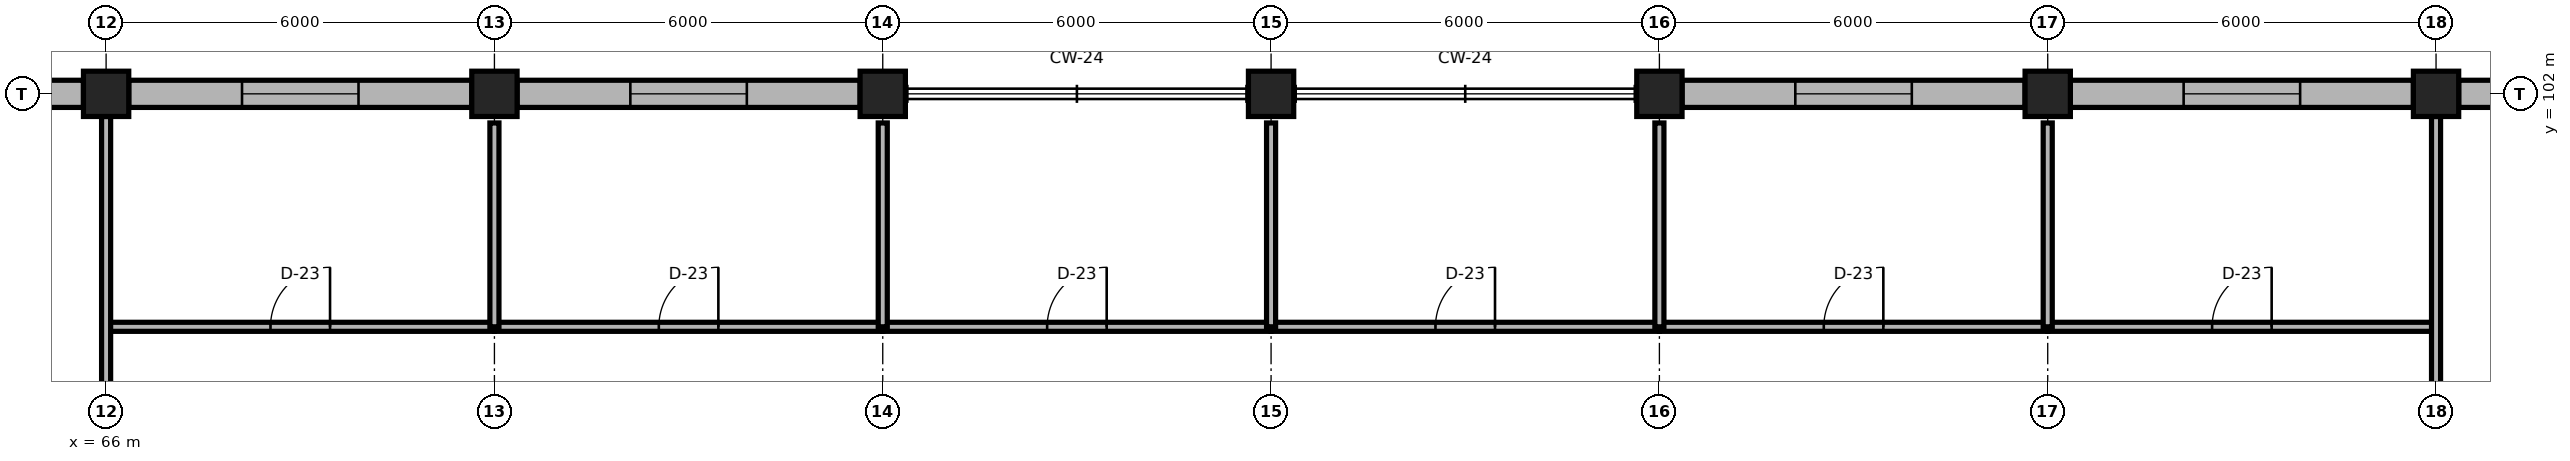
"""IFC4 building model, lengths in metres.
Left out: names, types, materials, properties, quantities, classifications, styles, units other than length and angle.
Written with IfcOpenShell. Run it as: python <this file> out.ifc"""

import sys

from ifc_helpers import new_model, si_unit, direction, frame, frame_2d, origin, origin_2d, place, context, subcontext, project, spatial, rectangle, extrude, element, fill, save


model = new_model("IFC4")
c1 = context("Model", 3, precision=1e-05, world=origin(), true_north=direction((0.0, 1.0)))
c2 = subcontext(c1, "Body", "Model", "MODEL_VIEW")
j1 = project(units=[si_unit("LENGTHUNIT", "METRE"), si_unit("PLANEANGLEUNIT", "RADIAN")], contexts=[c1])
p1 = place(None, origin())
s1 = spatial("IfcSite", under=j1, at=p1, CompositionType="ELEMENT")
p2 = place(p1, origin())
s2 = spatial("IfcBuilding", under=s1, at=p2, CompositionType="ELEMENT")
p3 = place(p2, frame((0.0, 0.0, 63.9)))
s3 = spatial("IfcBuildingStorey", under=s2, at=p3, CompositionType="ELEMENT", Elevation=63.9)
for number, where, z_axis, x_axis in (
    (1, (66.0, 102.0, 0.0), (0.0, 0.0, 1.0), (1.0, 0.0, 0.0)),
    (2, (72.0, 102.0, 0.0), (0.0, 0.0, 1.0), (1.0, 0.0, 0.0)),
    (3, (78.0, 102.0, 0.0), (0.0, 0.0, 1.0), (1.0, 0.0, 0.0)),
    (4, (84.0, 102.0, 0.0), (0.0, 0.0, 1.0), (1.0, 0.0, 0.0)),
    (5, (90.0, 102.0, 0.0), (0.0, 0.0, 1.0), (1.0, 0.0, 0.0)),
    (6, (96.0, 102.0, 0.0), (0.0, 0.0, 1.0), (1.0, 0.0, 0.0)),
    (7, (102.0, 102.0, 0.0), (0.0, 0.0, 1.0), (1.0, 0.0, 0.0)),
):
    element("IfcColumn", number, at=place(p3, frame(where, z_axis=z_axis, x_axis=x_axis)), inside=s3, PredefinedType="COLUMN", context=c2, shape_type="SweptSolid", body=[
        extrude(rectangle(XDim=0.7, YDim=0.7, at=origin_2d()), origin(), (0.0, 0.0, 1.0), 3.9),
    ])
p4 = place(p3, frame((60.35, 102.0, 0.0), z_axis=(0.0, 0.0, 1.0), x_axis=(1.0, 0.0, 0.0)))
e8 = element("IfcWall", 8, at=p4, inside=s3, PredefinedType="SOLIDWALL", context=c2, shape_type="SweptSolid", body=[
    extrude(rectangle(XDim=5.3, YDim=0.42, at=frame_2d((2.65, 0.0))), origin(), (0.0, 0.0, 1.0), 3.24),
])
p5 = place(p4, frame((1.75, 0.0, 0.85)))
e9 = element("IfcOpeningElement", 9, at=p5, cuts=e8, PredefinedType="OPENING", context=c2, shape_type="SweptSolid", body=[
    extrude(rectangle(XDim=1.8, YDim=1.95, at=frame_2d((0.9, 0.975))), frame((0.0, 0.225, 0.0), z_axis=(0.0, -1.0, 0.0), x_axis=(1.0, 0.0, 0.0)), (0.0, 0.0, 1.0), 0.45),
])
p6 = place(p3, frame((66.35, 102.0, 0.0), z_axis=(0.0, 0.0, 1.0), x_axis=(1.0, 0.0, 0.0)))
e10 = element("IfcWall", 10, at=p6, inside=s3, PredefinedType="SOLIDWALL", context=c2, shape_type="SweptSolid", body=[
    extrude(rectangle(XDim=5.3, YDim=0.42, at=frame_2d((2.65, 0.0))), origin(), (0.0, 0.0, 1.0), 3.24),
])
p7 = place(p6, frame((1.75, 0.0, 0.85)))
e11 = element("IfcOpeningElement", 11, at=p7, cuts=e10, PredefinedType="OPENING", context=c2, shape_type="SweptSolid", body=[
    extrude(rectangle(XDim=1.8, YDim=1.95, at=frame_2d((0.9, 0.975))), frame((0.0, 0.225, 0.0), z_axis=(0.0, -1.0, 0.0), x_axis=(1.0, 0.0, 0.0)), (0.0, 0.0, 1.0), 0.45),
])
p8 = place(p3, frame((72.35, 102.0, 0.0), z_axis=(0.0, 0.0, 1.0), x_axis=(1.0, 0.0, 0.0)))
e12 = element("IfcWall", 12, at=p8, inside=s3, PredefinedType="SOLIDWALL", context=c2, shape_type="SweptSolid", body=[
    extrude(rectangle(XDim=5.3, YDim=0.42, at=frame_2d((2.65, 0.0))), origin(), (0.0, 0.0, 1.0), 3.24),
])
p9 = place(p8, frame((1.75, 0.0, 0.85)))
e13 = element("IfcOpeningElement", 13, at=p9, cuts=e12, PredefinedType="OPENING", context=c2, shape_type="SweptSolid", body=[
    extrude(rectangle(XDim=1.8, YDim=1.95, at=frame_2d((0.9, 0.975))), frame((0.0, 0.225, 0.0), z_axis=(0.0, -1.0, 0.0), x_axis=(1.0, 0.0, 0.0)), (0.0, 0.0, 1.0), 0.45),
])
p10 = place(p3, frame((90.35, 102.0, 0.0), z_axis=(0.0, 0.0, 1.0), x_axis=(1.0, 0.0, 0.0)))
e14 = element("IfcWall", 14, at=p10, inside=s3, PredefinedType="SOLIDWALL", context=c2, shape_type="SweptSolid", body=[
    extrude(rectangle(XDim=5.3, YDim=0.42, at=frame_2d((2.65, 0.0))), origin(), (0.0, 0.0, 1.0), 3.24),
])
p11 = place(p10, frame((1.75, 0.0, 0.85)))
e15 = element("IfcOpeningElement", 15, at=p11, cuts=e14, PredefinedType="OPENING", context=c2, shape_type="SweptSolid", body=[
    extrude(rectangle(XDim=1.8, YDim=1.95, at=frame_2d((0.9, 0.975))), frame((0.0, 0.225, 0.0), z_axis=(0.0, -1.0, 0.0), x_axis=(1.0, 0.0, 0.0)), (0.0, 0.0, 1.0), 0.45),
])
p12 = place(p3, frame((96.35, 102.0, 0.0), z_axis=(0.0, 0.0, 1.0), x_axis=(1.0, 0.0, 0.0)))
e16 = element("IfcWall", 16, at=p12, inside=s3, PredefinedType="SOLIDWALL", context=c2, shape_type="SweptSolid", body=[
    extrude(rectangle(XDim=5.3, YDim=0.42, at=frame_2d((2.65, 0.0))), origin(), (0.0, 0.0, 1.0), 3.24),
])
p13 = place(p12, frame((1.75, 0.0, 0.85)))
e17 = element("IfcOpeningElement", 17, at=p13, cuts=e16, PredefinedType="OPENING", context=c2, shape_type="SweptSolid", body=[
    extrude(rectangle(XDim=1.8, YDim=1.95, at=frame_2d((0.9, 0.975))), frame((0.0, 0.225, 0.0), z_axis=(0.0, -1.0, 0.0), x_axis=(1.0, 0.0, 0.0)), (0.0, 0.0, 1.0), 0.45),
])
p14 = place(p3, frame((102.35, 102.0, 0.0), z_axis=(0.0, 0.0, 1.0), x_axis=(1.0, 0.0, 0.0)))
e18 = element("IfcWall", 18, at=p14, inside=s3, PredefinedType="SOLIDWALL", context=c2, shape_type="SweptSolid", body=[
    extrude(rectangle(XDim=5.3, YDim=0.42, at=frame_2d((2.65, 0.0))), origin(), (0.0, 0.0, 1.0), 3.24),
])
p15 = place(p14, frame((1.75, 0.0, 0.85)))
e19 = element("IfcOpeningElement", 19, at=p15, cuts=e18, PredefinedType="OPENING", context=c2, shape_type="SweptSolid", body=[
    extrude(rectangle(XDim=1.8, YDim=1.95, at=frame_2d((0.9, 0.975))), frame((0.0, 0.225, 0.0), z_axis=(0.0, -1.0, 0.0), x_axis=(1.0, 0.0, 0.0)), (0.0, 0.0, 1.0), 0.45),
])
p16 = place(p3, frame((66.0, 98.4, 0.0), z_axis=(0.0, 0.0, 1.0), x_axis=(1.0, 0.0, 0.0)))
e20 = element("IfcWall", 20, at=p16, inside=s3, PredefinedType="PARTITIONING", context=c2, shape_type="SweptSolid", body=[
    extrude(rectangle(XDim=6.0, YDim=0.14, at=frame_2d((3.0, 0.0))), origin(), (0.0, 0.0, 1.0), 3.66),
])
p17 = place(p16, frame((2.54, 0.0, 0.0)))
e21 = element("IfcOpeningElement", 21, at=p17, cuts=e20, PredefinedType="OPENING", context=c2, shape_type="SweptSolid", body=[
    extrude(rectangle(XDim=0.92, YDim=2.15, at=frame_2d((0.46, 1.075))), frame((0.0, 0.085, 0.0), z_axis=(0.0, -1.0, 0.0), x_axis=(1.0, 0.0, 0.0)), (0.0, 0.0, 1.0), 0.17),
])
p18 = place(p3, frame((72.0, 98.4, 0.0), z_axis=(0.0, 0.0, 1.0), x_axis=(1.0, 0.0, 0.0)))
e22 = element("IfcWall", 22, at=p18, inside=s3, PredefinedType="PARTITIONING", context=c2, shape_type="SweptSolid", body=[
    extrude(rectangle(XDim=6.0, YDim=0.14, at=frame_2d((3.0, 0.0))), origin(), (0.0, 0.0, 1.0), 3.66),
])
p19 = place(p18, frame((2.54, 0.0, 0.0)))
e23 = element("IfcOpeningElement", 23, at=p19, cuts=e22, PredefinedType="OPENING", context=c2, shape_type="SweptSolid", body=[
    extrude(rectangle(XDim=0.92, YDim=2.15, at=frame_2d((0.46, 1.075))), frame((0.0, 0.085, 0.0), z_axis=(0.0, -1.0, 0.0), x_axis=(1.0, 0.0, 0.0)), (0.0, 0.0, 1.0), 0.17),
])
p20 = place(p3, frame((78.0, 98.4, 0.0), z_axis=(0.0, 0.0, 1.0), x_axis=(1.0, 0.0, 0.0)))
e24 = element("IfcWall", 24, at=p20, inside=s3, PredefinedType="PARTITIONING", context=c2, shape_type="SweptSolid", body=[
    extrude(rectangle(XDim=6.0, YDim=0.14, at=frame_2d((3.0, 0.0))), origin(), (0.0, 0.0, 1.0), 3.66),
])
p21 = place(p20, frame((2.54, 0.0, 0.0)))
e25 = element("IfcOpeningElement", 25, at=p21, cuts=e24, PredefinedType="OPENING", context=c2, shape_type="SweptSolid", body=[
    extrude(rectangle(XDim=0.92, YDim=2.15, at=frame_2d((0.46, 1.075))), frame((0.0, 0.085, 0.0), z_axis=(0.0, -1.0, 0.0), x_axis=(1.0, 0.0, 0.0)), (0.0, 0.0, 1.0), 0.17),
])
p22 = place(p3, frame((84.0, 98.4, 0.0), z_axis=(0.0, 0.0, 1.0), x_axis=(1.0, 0.0, 0.0)))
e26 = element("IfcWall", 26, at=p22, inside=s3, PredefinedType="PARTITIONING", context=c2, shape_type="SweptSolid", body=[
    extrude(rectangle(XDim=6.0, YDim=0.14, at=frame_2d((3.0, 0.0))), origin(), (0.0, 0.0, 1.0), 3.66),
])
p23 = place(p22, frame((2.54, 0.0, 0.0)))
e27 = element("IfcOpeningElement", 27, at=p23, cuts=e26, PredefinedType="OPENING", context=c2, shape_type="SweptSolid", body=[
    extrude(rectangle(XDim=0.92, YDim=2.15, at=frame_2d((0.46, 1.075))), frame((0.0, 0.085, 0.0), z_axis=(0.0, -1.0, 0.0), x_axis=(1.0, 0.0, 0.0)), (0.0, 0.0, 1.0), 0.17),
])
p24 = place(p3, frame((90.0, 98.4, 0.0), z_axis=(0.0, 0.0, 1.0), x_axis=(1.0, 0.0, 0.0)))
e28 = element("IfcWall", 28, at=p24, inside=s3, PredefinedType="PARTITIONING", context=c2, shape_type="SweptSolid", body=[
    extrude(rectangle(XDim=6.0, YDim=0.14, at=frame_2d((3.0, 0.0))), origin(), (0.0, 0.0, 1.0), 3.66),
])
p25 = place(p24, frame((2.54, 0.0, 0.0)))
e29 = element("IfcOpeningElement", 29, at=p25, cuts=e28, PredefinedType="OPENING", context=c2, shape_type="SweptSolid", body=[
    extrude(rectangle(XDim=0.92, YDim=2.15, at=frame_2d((0.46, 1.075))), frame((0.0, 0.085, 0.0), z_axis=(0.0, -1.0, 0.0), x_axis=(1.0, 0.0, 0.0)), (0.0, 0.0, 1.0), 0.17),
])
p26 = place(p3, frame((96.0, 98.4, 0.0), z_axis=(0.0, 0.0, 1.0), x_axis=(1.0, 0.0, 0.0)))
e30 = element("IfcWall", 30, at=p26, inside=s3, PredefinedType="PARTITIONING", context=c2, shape_type="SweptSolid", body=[
    extrude(rectangle(XDim=6.0, YDim=0.14, at=frame_2d((3.0, 0.0))), origin(), (0.0, 0.0, 1.0), 3.66),
])
p27 = place(p26, frame((2.54, 0.0, 0.0)))
e31 = element("IfcOpeningElement", 31, at=p27, cuts=e30, PredefinedType="OPENING", context=c2, shape_type="SweptSolid", body=[
    extrude(rectangle(XDim=0.92, YDim=2.15, at=frame_2d((0.46, 1.075))), frame((0.0, 0.085, 0.0), z_axis=(0.0, -1.0, 0.0), x_axis=(1.0, 0.0, 0.0)), (0.0, 0.0, 1.0), 0.17),
])
for number, where, z_axis, x_axis in (
    (32, (72.0, 98.4, 0.0), (0.0, 0.0, 1.0), (0.0, 1.0, 0.0)),
    (33, (78.0, 98.4, 0.0), (0.0, 0.0, 1.0), (0.0, 1.0, 0.0)),
    (34, (84.0, 98.4, 0.0), (0.0, 0.0, 1.0), (0.0, 1.0, 0.0)),
    (35, (90.0, 98.4, 0.0), (0.0, 0.0, 1.0), (0.0, 1.0, 0.0)),
    (36, (96.0, 98.4, 0.0), (0.0, 0.0, 1.0), (0.0, 1.0, 0.0)),
):
    element("IfcWall", number, at=place(p3, frame(where, z_axis=z_axis, x_axis=x_axis)), inside=s3, PredefinedType="PARTITIONING", context=c2, shape_type="SweptSolid", body=[
        extrude(rectangle(XDim=3.15, YDim=0.14, at=frame_2d((1.575, 0.0))), origin(), (0.0, 0.0, 1.0), 3.369),
    ])
for number, where, z_axis, x_axis in (
    (37, (66.0, 96.35, 0.0), (0.0, 0.0, 1.0), (0.0, 1.0, 0.0)),
    (38, (102.0, 96.35, 0.0), (0.0, 0.0, 1.0), (0.0, 1.0, 0.0)),
):
    element("IfcWall", number, at=place(p3, frame(where, z_axis=z_axis, x_axis=x_axis)), inside=s3, PredefinedType="PARTITIONING", context=c2, shape_type="SweptSolid", body=[
        extrude(rectangle(XDim=5.3, YDim=0.14, at=frame_2d((2.65, 0.0))), origin(), (0.0, 0.0, 1.0), 3.369),
    ])
p28 = place(p7, origin())
e39 = element("IfcWindow", 39, at=p28, inside=s3, PartitioningType="SINGLE_PANEL", PredefinedType="WINDOW", context=c2, shape_type="SweptSolid", body=[
    extrude(rectangle(XDim=1.8, YDim=1.95, at=frame_2d((0.9, 0.975))), frame((0.0, 0.03, 0.0), z_axis=(0.0, -1.0, 0.0), x_axis=(1.0, 0.0, 0.0)), (0.0, 0.0, 1.0), 0.06),
])
fill(e11, e39)
p29 = place(p9, origin())
e40 = element("IfcWindow", 40, at=p29, inside=s3, PartitioningType="SINGLE_PANEL", PredefinedType="WINDOW", context=c2, shape_type="SweptSolid", body=[
    extrude(rectangle(XDim=1.8, YDim=1.95, at=frame_2d((0.9, 0.975))), frame((0.0, 0.03, 0.0), z_axis=(0.0, -1.0, 0.0), x_axis=(1.0, 0.0, 0.0)), (0.0, 0.0, 1.0), 0.06),
])
fill(e13, e40)
p30 = place(p11, origin())
e41 = element("IfcWindow", 41, at=p30, inside=s3, PartitioningType="SINGLE_PANEL", PredefinedType="WINDOW", context=c2, shape_type="SweptSolid", body=[
    extrude(rectangle(XDim=1.8, YDim=1.95, at=frame_2d((0.9, 0.975))), frame((0.0, 0.03, 0.0), z_axis=(0.0, -1.0, 0.0), x_axis=(1.0, 0.0, 0.0)), (0.0, 0.0, 1.0), 0.06),
])
fill(e15, e41)
p31 = place(p13, origin())
e42 = element("IfcWindow", 42, at=p31, inside=s3, PartitioningType="SINGLE_PANEL", PredefinedType="WINDOW", context=c2, shape_type="SweptSolid", body=[
    extrude(rectangle(XDim=1.8, YDim=1.95, at=frame_2d((0.9, 0.975))), frame((0.0, 0.03, 0.0), z_axis=(0.0, -1.0, 0.0), x_axis=(1.0, 0.0, 0.0)), (0.0, 0.0, 1.0), 0.06),
])
fill(e17, e42)
p32 = place(p17, origin())
e43 = element("IfcDoor", 43, at=p32, inside=s3, OperationType="SINGLE_SWING_RIGHT", PredefinedType="DOOR", context=c2, shape_type="SweptSolid", body=[
    extrude(rectangle(XDim=0.92, YDim=2.15, at=frame_2d((0.46, 1.075))), frame((0.0, 0.025, 0.0), z_axis=(0.0, -1.0, 0.0), x_axis=(1.0, 0.0, 0.0)), (0.0, 0.0, 1.0), 0.05),
])
fill(e21, e43)
p33 = place(p19, origin())
e44 = element("IfcDoor", 44, at=p33, inside=s3, OperationType="SINGLE_SWING_RIGHT", PredefinedType="DOOR", context=c2, shape_type="SweptSolid", body=[
    extrude(rectangle(XDim=0.92, YDim=2.15, at=frame_2d((0.46, 1.075))), frame((0.0, 0.025, 0.0), z_axis=(0.0, -1.0, 0.0), x_axis=(1.0, 0.0, 0.0)), (0.0, 0.0, 1.0), 0.05),
])
fill(e23, e44)
p34 = place(p21, origin())
e45 = element("IfcDoor", 45, at=p34, inside=s3, OperationType="SINGLE_SWING_RIGHT", PredefinedType="DOOR", context=c2, shape_type="SweptSolid", body=[
    extrude(rectangle(XDim=0.92, YDim=2.15, at=frame_2d((0.46, 1.075))), frame((0.0, 0.025, 0.0), z_axis=(0.0, -1.0, 0.0), x_axis=(1.0, 0.0, 0.0)), (0.0, 0.0, 1.0), 0.05),
])
fill(e25, e45)
p35 = place(p23, origin())
e46 = element("IfcDoor", 46, at=p35, inside=s3, OperationType="SINGLE_SWING_RIGHT", PredefinedType="DOOR", context=c2, shape_type="SweptSolid", body=[
    extrude(rectangle(XDim=0.92, YDim=2.15, at=frame_2d((0.46, 1.075))), frame((0.0, 0.025, 0.0), z_axis=(0.0, -1.0, 0.0), x_axis=(1.0, 0.0, 0.0)), (0.0, 0.0, 1.0), 0.05),
])
fill(e27, e46)
p36 = place(p25, origin())
e47 = element("IfcDoor", 47, at=p36, inside=s3, OperationType="SINGLE_SWING_RIGHT", PredefinedType="DOOR", context=c2, shape_type="SweptSolid", body=[
    extrude(rectangle(XDim=0.92, YDim=2.15, at=frame_2d((0.46, 1.075))), frame((0.0, 0.025, 0.0), z_axis=(0.0, -1.0, 0.0), x_axis=(1.0, 0.0, 0.0)), (0.0, 0.0, 1.0), 0.05),
])
fill(e29, e47)
p37 = place(p27, origin())
e48 = element("IfcDoor", 48, at=p37, inside=s3, OperationType="SINGLE_SWING_RIGHT", PredefinedType="DOOR", context=c2, shape_type="SweptSolid", body=[
    extrude(rectangle(XDim=0.92, YDim=2.15, at=frame_2d((0.46, 1.075))), frame((0.0, 0.025, 0.0), z_axis=(0.0, -1.0, 0.0), x_axis=(1.0, 0.0, 0.0)), (0.0, 0.0, 1.0), 0.05),
])
fill(e31, e48)
save(model, sys.argv[1])
